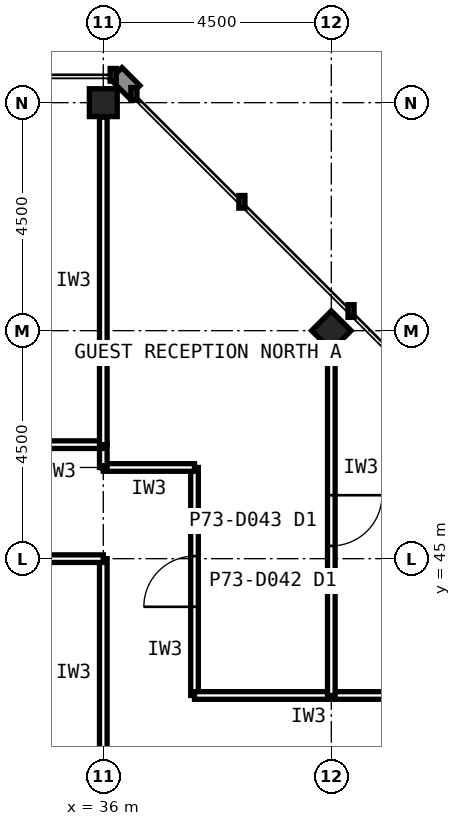
"""IFC4 building model, lengths in metres.
Left out: names, types, materials, properties, quantities, classifications, styles, units other than length and angle.
Written with IfcOpenShell. Run it as: python <this file> out.ifc"""

import sys

from ifc_helpers import new_model, si_unit, direction, frame, frame_2d, origin, origin_2d, place, context, subcontext, project, spatial, rectangle, hollow_rectangle, extrude, element, fill, save


model = new_model("IFC4")
c1 = context("Model", 3, precision=1e-05, world=origin(), true_north=direction((0.0, 1.0)))
c2 = subcontext(c1, "Body", "Model", "MODEL_VIEW")
j1 = project(units=[si_unit("LENGTHUNIT", "METRE"), si_unit("PLANEANGLEUNIT", "RADIAN")], contexts=[c1])
p1 = place(None, origin())
s1 = spatial("IfcSite", under=j1, at=p1, CompositionType="ELEMENT")
p2 = place(p1, origin())
s2 = spatial("IfcBuilding", under=s1, at=p2, CompositionType="ELEMENT")
p3 = place(p2, frame((0.0, 0.0, 302.6)))
s3 = spatial("IfcBuildingStorey", under=s2, at=p3, CompositionType="ELEMENT", Elevation=302.6)
for number, where, z_axis, x_axis in (
    (1, (36.0, 54.0, 0.0), (0.0, 0.0, 1.0), (1.0, 0.0, 0.0)),
    (2, (40.5, 49.5, 0.0), (0.0, 0.0, 1.0), (0.707, 0.707, 0.0)),
):
    element("IfcColumn", number, at=place(p3, frame(where, z_axis=z_axis, x_axis=x_axis)), inside=s3, PredefinedType="COLUMN", context=c2, shape_type="SweptSolid", body=[
        extrude(hollow_rectangle(XDim=0.55, YDim=0.55, WallThickness=0.025, at=origin_2d()), origin(), (0.0, 0.0, 1.0), 4.0),
    ])
p4 = place(p3, frame((37.8, 42.3, 0.0), z_axis=(0.0, 0.0, 1.0), x_axis=(0.0, 1.0, 0.0)))
e3 = element("IfcWall", 3, at=p4, inside=s3, PredefinedType="PARTITIONING", context=c2, shape_type="SweptSolid", body=[
    extrude(rectangle(XDim=4.5, YDim=0.15, at=frame_2d((2.25, 0.0))), origin(), (0.0, 0.0, 1.0), 3.84),
])
p5 = place(p4, frame((1.75, 0.0, 0.0)))
e4 = element("IfcOpeningElement", 4, at=p5, cuts=e3, PredefinedType="OPENING", context=c2, shape_type="SweptSolid", body=[
    extrude(rectangle(XDim=1.0, YDim=2.1, at=frame_2d((0.5, 1.05))), frame((0.0, 0.085, 0.0), z_axis=(0.0, -1.0, 0.0), x_axis=(1.0, 0.0, 0.0)), (0.0, 0.0, 1.0), 0.17),
])
p6 = place(p3, frame((42.3, 42.3, 0.0), z_axis=(0.0, 0.0, 1.0), x_axis=(-1.0, 0.0, 0.0)))
e5 = element("IfcWall", 5, at=p6, inside=s3, PredefinedType="PARTITIONING", context=c2, shape_type="SweptSolid", body=[
    extrude(rectangle(XDim=4.5, YDim=0.15, at=frame_2d((2.25, 0.0))), origin(), (0.0, 0.0, 1.0), 3.84),
])
p7 = place(p3, frame((37.8, 46.8, 0.0), z_axis=(0.0, 0.0, 1.0), x_axis=(-1.0, 0.0, 0.0)))
e6 = element("IfcWall", 6, at=p7, inside=s3, PredefinedType="PARTITIONING", context=c2, shape_type="SweptSolid", body=[
    extrude(rectangle(XDim=1.8, YDim=0.15, at=frame_2d((0.9, 0.0))), origin(), (0.0, 0.0, 1.0), 3.84),
])
p8 = place(p3, frame((36.0, 46.8, 0.0), z_axis=(0.0, 0.0, 1.0), x_axis=(0.0, 1.0, 0.0)))
e7 = element("IfcWall", 7, at=p8, inside=s3, PredefinedType="PARTITIONING", context=c2, shape_type="SweptSolid", body=[
    extrude(rectangle(XDim=0.46, YDim=0.15, at=frame_2d((0.23, 0.0))), origin(), (0.0, 0.0, 1.0), 2.989),
])
p9 = place(p3, frame((18.0, 47.25, 0.0), z_axis=(0.0, 0.0, 1.0), x_axis=(1.0, 0.0, 0.0)))
e8 = element("IfcWall", 8, at=p9, inside=s3, PredefinedType="PARTITIONING", context=c2, shape_type="SweptSolid", body=[
    extrude(rectangle(XDim=18.0, YDim=0.15, at=frame_2d((9.0, 0.0))), origin(), (0.0, 0.0, 1.0), 3.84),
])
p10 = place(p9, frame((8.5, 0.0, 0.0)))
e9 = element("IfcOpeningElement", 9, at=p10, cuts=e8, PredefinedType="OPENING", context=c2, shape_type="SweptSolid", body=[
    extrude(rectangle(XDim=1.0, YDim=2.1, at=frame_2d((0.5, 1.05))), frame((0.0, 0.085, 0.0), z_axis=(0.0, -1.0, 0.0), x_axis=(1.0, 0.0, 0.0)), (0.0, 0.0, 1.0), 0.17),
])
p11 = place(p3, frame((36.0, 47.25, 0.0), z_axis=(0.0, 0.0, 1.0), x_axis=(0.0, 1.0, 0.0)))
e10 = element("IfcWall", 10, at=p11, inside=s3, PredefinedType="PARTITIONING", context=c2, shape_type="SweptSolid", body=[
    extrude(rectangle(XDim=6.465, YDim=0.15, at=frame_2d((3.232, 0.0))), origin(), (0.0, 0.0, 1.0), 2.989),
])
p12 = place(p3, frame((36.0, 40.5, 0.0), z_axis=(0.0, 0.0, 1.0), x_axis=(0.0, 1.0, 0.0)))
e11 = element("IfcWall", 11, at=p12, inside=s3, PredefinedType="PARTITIONING", context=c2, shape_type="SweptSolid", body=[
    extrude(rectangle(XDim=4.5, YDim=0.15, at=frame_2d((2.25, 0.0))), origin(), (0.0, 0.0, 1.0), 2.989),
])
p13 = place(p3, frame((36.0, 45.0, 0.0), z_axis=(0.0, 0.0, 1.0), x_axis=(-1.0, 0.0, 0.0)))
e12 = element("IfcWall", 12, at=p13, inside=s3, PredefinedType="PARTITIONING", context=c2, shape_type="SweptSolid", body=[
    extrude(rectangle(XDim=13.5, YDim=0.15, at=frame_2d((6.75, 0.0))), origin(), (0.0, 0.0, 1.0), 3.84),
])
p14 = place(p3, frame((40.5, 49.205, 0.0), z_axis=(0.0, 0.0, 1.0), x_axis=(0.0, -1.0, 0.0)))
e13 = element("IfcWall", 13, at=p14, inside=s3, PredefinedType="PARTITIONING", context=c2, shape_type="SweptSolid", body=[
    extrude(rectangle(XDim=6.905, YDim=0.15, at=frame_2d((3.453, 0.0))), origin(), (0.0, 0.0, 1.0), 2.989),
])
p15 = place(p14, frame((2.952, 0.0, 0.0)))
e14 = element("IfcOpeningElement", 14, at=p15, cuts=e13, PredefinedType="OPENING", context=c2, shape_type="SweptSolid", body=[
    extrude(rectangle(XDim=1.0, YDim=2.1, at=frame_2d((0.5, 1.05))), frame((0.0, 0.085, 0.0), z_axis=(0.0, -1.0, 0.0), x_axis=(1.0, 0.0, 0.0)), (0.0, 0.0, 1.0), 0.17),
])
p16 = place(p5, origin())
e15 = element("IfcDoor", 15, at=p16, inside=s3, OperationType="SINGLE_SWING_LEFT", PredefinedType="DOOR", context=c2, shape_type="SweptSolid", body=[
    extrude(rectangle(XDim=1.0, YDim=2.1, at=frame_2d((0.5, 1.05))), frame((0.0, 0.025, 0.0), z_axis=(0.0, -1.0, 0.0), x_axis=(1.0, 0.0, 0.0)), (0.0, 0.0, 1.0), 0.05),
])
fill(e4, e15)
p17 = place(p15, origin())
e16 = element("IfcDoor", 16, at=p17, inside=s3, OperationType="SINGLE_SWING_LEFT", PredefinedType="DOOR", context=c2, shape_type="SweptSolid", body=[
    extrude(rectangle(XDim=1.0, YDim=2.1, at=frame_2d((0.5, 1.05))), frame((0.0, 0.025, 0.0), z_axis=(0.0, -1.0, 0.0), x_axis=(1.0, 0.0, 0.0)), (0.0, 0.0, 1.0), 0.05),
])
fill(e14, e16)
save(model, sys.argv[1])
